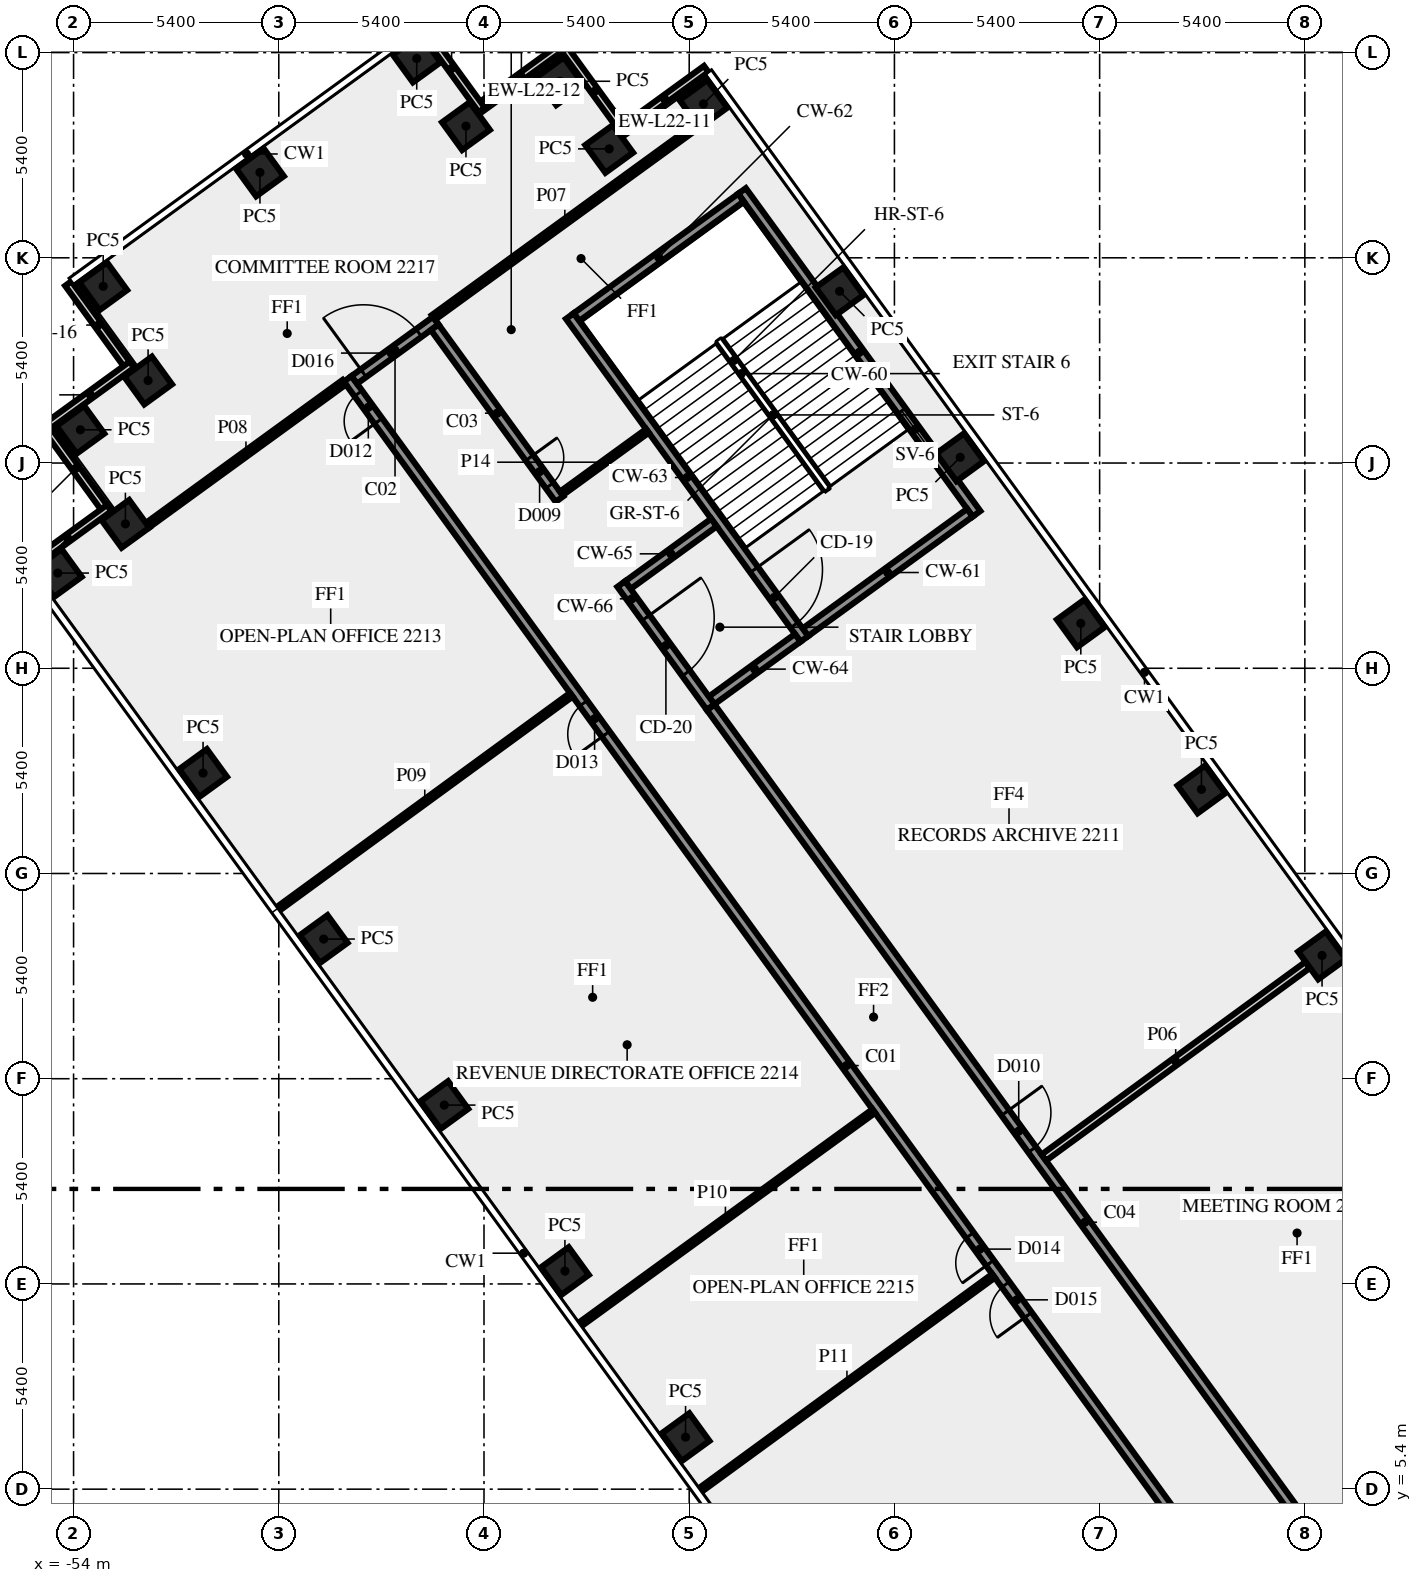
"""IFC4 building model, lengths in metres.
Left out: names, types, materials, properties, quantities, classifications, styles, units other than length and angle.
Written with IfcOpenShell. Run it as: python <this file> out.ifc"""

import sys

from ifc_helpers import new_model, si_unit, direction, frame, frame_2d, origin, origin_2d, place, context, subcontext, project, spatial, rectangle, extrude, element, fill, save


model = new_model("IFC4")
c1 = context("Model", 3, precision=1e-05, world=origin(), true_north=direction((0.0, 1.0)))
c2 = subcontext(c1, "Body", "Model", "MODEL_VIEW")
j1 = project(units=[si_unit("LENGTHUNIT", "METRE"), si_unit("PLANEANGLEUNIT", "RADIAN")], contexts=[c1])
p1 = place(None, origin())
s1 = spatial("IfcSite", under=j1, at=p1, CompositionType="ELEMENT")
p2 = place(p1, origin())
s2 = spatial("IfcBuilding", under=s1, at=p2, CompositionType="ELEMENT")
p3 = place(p2, frame((0.0, 0.0, 97.0)))
s3 = spatial("IfcBuildingStorey", under=s2, at=p3, CompositionType="ELEMENT", Elevation=97.0)
for number, where, z_axis, x_axis in (
    (1, (-21.147, 19.444, 0.0), (0.0, 0.0, 1.0), (-0.588, 0.809, 0.0)),
    (2, (-24.321, 23.812, 0.0), (0.0, 0.0, 1.0), (-0.588, 0.809, 0.0)),
    (3, (-27.495, 28.181, 0.0), (0.0, 0.0, 1.0), (-0.588, 0.809, 0.0)),
    (4, (-30.669, 32.55, 0.0), (0.0, 0.0, 1.0), (-0.588, 0.809, 0.0)),
    (5, (-33.843, 36.919, 0.0), (0.0, 0.0, 1.0), (-0.588, 0.809, 0.0)),
    (6, (-37.425, 41.85, 0.0), (0.0, 0.0, 1.0), (-0.588, 0.809, 0.0)),
    (7, (-39.906, 40.666, 0.0), (0.0, 0.0, 1.0), (-0.588, 0.809, 0.0)),
    (8, (-41.2, 42.445, 0.0), (0.0, 0.0, 1.0), (-0.588, 0.809, 0.0)),
    (9, (-43.675, 41.265, 0.0), (0.0, 0.0, 1.0), (-0.809, -0.588, 0.0)),
    (10, (-44.97, 43.045, 0.0), (0.0, 0.0, 1.0), (-0.809, -0.588, 0.0)),
    (11, (-49.096, 40.047, 0.0), (0.0, 0.0, 1.0), (-0.809, -0.588, 0.0)),
    (12, (-53.22, 37.05, 0.0), (0.0, 0.0, 1.0), (0.588, -0.809, 0.0)),
    (13, (-52.039, 34.571, 0.0), (0.0, 0.0, 1.0), (-0.809, -0.588, 0.0)),
    (14, (-53.82, 33.275, 0.0), (0.0, 0.0, 1.0), (0.588, -0.809, 0.0)),
    (15, (-52.636, 30.8, 0.0), (0.0, 0.0, 1.0), (-0.809, -0.588, 0.0)),
    (16, (-54.415, 29.505, 0.0), (0.0, 0.0, 1.0), (0.588, -0.809, 0.0)),
    (17, (-50.592, 24.243, 0.0), (0.0, 0.0, 1.0), (0.588, -0.809, 0.0)),
    (18, (-47.418, 19.875, 0.0), (0.0, 0.0, 1.0), (0.588, -0.809, 0.0)),
    (19, (-44.244, 15.506, 0.0), (0.0, 0.0, 1.0), (0.588, -0.809, 0.0)),
    (20, (-41.07, 11.137, 0.0), (0.0, 0.0, 1.0), (0.588, -0.809, 0.0)),
    (21, (-37.896, 6.769, 0.0), (0.0, 0.0, 1.0), (0.588, -0.809, 0.0)),
):
    element("IfcColumn", number, at=place(p3, frame(where, z_axis=z_axis, x_axis=x_axis)), inside=s3, PredefinedType="COLUMN", context=c2, shape_type="SweptSolid", body=[
        extrude(rectangle(XDim=0.9, YDim=0.9, at=origin_2d()), origin(), (0.0, 0.0, 1.0), 3.65),
    ])
p4 = place(p3, frame((-37.353, 42.768, 0.0), z_axis=(0.0, 0.0, 1.0), x_axis=(-0.809033161865, -0.587762999008, 0.0)))
e22 = element("IfcWall", 22, at=p4, inside=s3, PredefinedType="SOLIDWALL", context=c2, shape_type="SweptSolid", body=[
    extrude(rectangle(XDim=2.7, YDim=0.2, at=frame_2d((1.35, 0.0))), origin(), (0.0, 0.0, 1.0), 3.65),
])
p5 = place(p3, frame((-39.488, 41.094, 0.0), z_axis=(0.0, 0.0, 1.0), x_axis=(-0.587806000234, 0.809001919707, 0.0)))
e23 = element("IfcWall", 23, at=p5, inside=s3, PredefinedType="SOLIDWALL", context=c2, shape_type="SweptSolid", body=[
    extrude(rectangle(XDim=2.7, YDim=0.2, at=frame_2d((1.35, 0.0))), origin(), (0.0, 0.0, 1.0), 3.65),
])
for number, where, z_axis, x_axis in (
    (24, (-41.124, 43.366, 0.0), (0.0, 0.0, 1.0), (-0.809, -0.588, 0.0)),
    (25, (-43.259, 41.691, 0.0), (0.0, 0.0, 1.0), (-0.588, 0.809, 0.0)),
    (26, (-54.14, 37.123, 0.0), (0.0, 0.0, 1.0), (0.588, -0.809, 0.0)),
    (27, (-52.465, 34.987, 0.0), (0.0, 0.0, 1.0), (-0.809, -0.588, 0.0)),
):
    element("IfcWall", number, at=place(p3, frame(where, z_axis=z_axis, x_axis=x_axis)), inside=s3, PredefinedType="SOLIDWALL", context=c2, shape_type="SweptSolid", body=[
        extrude(rectangle(XDim=2.7, YDim=0.2, at=frame_2d((1.35, 0.0))), origin(), (0.0, 0.0, 1.0), 3.65),
    ])
p6 = place(p3, frame((-54.738, 33.351, 0.0), z_axis=(0.0, 0.0, 1.0), x_axis=(0.587779184282, -0.809021403008, 0.0)))
e28 = element("IfcWall", 28, at=p6, inside=s3, PredefinedType="SOLIDWALL", context=c2, shape_type="SweptSolid", body=[
    extrude(rectangle(XDim=2.7, YDim=0.2, at=frame_2d((1.35, 0.0))), origin(), (0.0, 0.0, 1.0), 3.65),
])
p7 = place(p3, frame((-53.063, 31.216, 0.0), z_axis=(0.0, 0.0, 1.0), x_axis=(-0.809033161865, -0.587762999008, 0.0)))
e29 = element("IfcWall", 29, at=p7, inside=s3, PredefinedType="SOLIDWALL", context=c2, shape_type="SweptSolid", body=[
    extrude(rectangle(XDim=2.7, YDim=0.2, at=frame_2d((1.35, 0.0))), origin(), (0.0, 0.0, 1.0), 3.65),
])
p8 = place(p3, frame((-30.24, 31.064, 0.0), z_axis=(0.0, 0.0, 1.0), x_axis=(-0.587795589702, 0.809009483706, 0.0)))
e30 = element("IfcWall", 30, at=p8, inside=s3, PredefinedType="SHEAR", context=c2, shape_type="SweptSolid", body=[
    extrude(rectangle(XDim=10.5, YDim=0.25, at=frame_2d((5.25, 0.0))), origin(), (0.0, 0.0, 1.0), 3.65),
])
p9 = place(p8, frame((2.15, 0.0, 1.0)))
e31 = element("IfcOpeningElement", 31, at=p9, cuts=e30, PredefinedType="OPENING", context=c2, shape_type="SweptSolid", body=[
    extrude(rectangle(XDim=1.2, YDim=1.2, at=frame_2d((0.6, 0.6))), frame((0.0, 0.135, 0.0), z_axis=(0.0, -1.0, 0.0), x_axis=(1.0, 0.0, 0.0)), (0.0, 0.0, 1.0), 0.27),
])
p10 = place(p3, frame((-30.414, 31.092, 0.0), z_axis=(0.0, 0.0, 1.0), x_axis=(-0.8089984606, -0.587810760999, 0.0)))
e32 = element("IfcWall", 32, at=p10, inside=s3, PredefinedType="SHEAR", context=c2, shape_type="SweptSolid", body=[
    extrude(rectangle(XDim=5.35, YDim=0.25, at=frame_2d((2.675, 0.0))), origin(), (0.0, 0.0, 1.0), 3.65),
])
p11 = place(p3, frame((-36.439, 39.384, 0.0), z_axis=(0.0, 0.0, 1.0), x_axis=(-0.809020161303, -0.587780893365, 0.0)))
e33 = element("IfcWall", 33, at=p11, inside=s3, PredefinedType="SHEAR", context=c2, shape_type="SweptSolid", body=[
    extrude(rectangle(XDim=5.35, YDim=0.25, at=frame_2d((2.675, 0.0))), origin(), (0.0, 0.0, 1.0), 3.65),
])
p12 = place(p3, frame((-40.942, 36.267, 0.0), z_axis=(0.0, 0.0, 1.0), x_axis=(0.587795589702, -0.809009483706, 0.0)))
e34 = element("IfcWall", 34, at=p12, inside=s3, PredefinedType="SHEAR", context=c2, shape_type="SweptSolid", body=[
    extrude(rectangle(XDim=10.5, YDim=0.25, at=frame_2d((5.25, 0.0))), origin(), (0.0, 0.0, 1.0), 3.65),
])
p13 = place(p12, frame((8.25, 0.0, 0.0)))
e35 = element("IfcOpeningElement", 35, at=p13, cuts=e34, PredefinedType="OPENING", context=c2, shape_type="SweptSolid", body=[
    extrude(rectangle(XDim=1.8, YDim=2.1, at=frame_2d((0.9, 1.05))), frame((0.0, 0.135, 0.0), z_axis=(0.0, -1.0, 0.0), x_axis=(1.0, 0.0, 0.0)), (0.0, 0.0, 1.0), 0.27),
])
for number, where, z_axis, x_axis in (
    (36, (-34.945, 27.8, 0.0), (0.0, 0.0, 1.0), (-0.809, -0.588, 0.0)),
    (37, (-37.149, 30.834, 0.0), (0.0, 0.0, 1.0), (-0.809, -0.588, 0.0)),
):
    element("IfcWall", number, at=place(p3, frame(where, z_axis=z_axis, x_axis=x_axis)), inside=s3, PredefinedType="SHEAR", context=c2, shape_type="SweptSolid", body=[
        extrude(rectangle(XDim=2.8, YDim=0.25, at=frame_2d((1.4, 0.0))), origin(), (0.0, 0.0, 1.0), 3.65),
    ])
p14 = place(p3, frame((-39.589, 29.216, 0.0), z_axis=(0.0, 0.0, 1.0), x_axis=(0.587772420479, -0.809026317077, 0.0)))
e38 = element("IfcWall", 38, at=p14, inside=s3, PredefinedType="SHEAR", context=c2, shape_type="SweptSolid", body=[
    extrude(rectangle(XDim=4.0, YDim=0.25, at=frame_2d((2.0, 0.0))), origin(), (0.0, 0.0, 1.0), 3.65),
])
p15 = place(p14, frame((1.1, 0.0, 0.0)))
e39 = element("IfcOpeningElement", 39, at=p15, cuts=e38, PredefinedType="OPENING", context=c2, shape_type="SweptSolid", body=[
    extrude(rectangle(XDim=1.8, YDim=2.1, at=frame_2d((0.9, 1.05))), frame((0.0, 0.135, 0.0), z_axis=(0.0, -1.0, 0.0), x_axis=(1.0, 0.0, 0.0)), (0.0, 0.0, 1.0), 0.27),
])
p16 = place(p3, frame((-20.531, -1.523, 0.0), z_axis=(0.0, 0.0, 1.0), x_axis=(-0.587784593204, 0.809017473231, 0.0)))
e40 = element("IfcWall", 40, at=p16, inside=s3, PredefinedType="SOLIDWALL", context=c2, shape_type="SweptSolid", body=[
    extrude(rectangle(XDim=44.67, YDim=0.25, at=frame_2d((22.335, 0.0))), origin(), (0.0, 0.0, 1.0), 3.65),
])
p17 = place(p16, frame((43.296, 0.0, 0.0)))
e41 = element("IfcOpeningElement", 41, at=p17, cuts=e40, PredefinedType="OPENING", context=c2, shape_type="SweptSolid", body=[
    extrude(rectangle(XDim=0.9, YDim=2.1, at=frame_2d((0.45, 1.05))), frame((0.0, 0.135, 0.0), z_axis=(0.0, -1.0, 0.0), x_axis=(1.0, 0.0, 0.0)), (0.0, 0.0, 1.0), 0.27),
])
p18 = place(p16, frame((15.916, 0.0, 0.0)))
e42 = element("IfcOpeningElement", 42, at=p18, cuts=e40, PredefinedType="OPENING", context=c2, shape_type="SweptSolid", body=[
    extrude(rectangle(XDim=0.9, YDim=2.1, at=frame_2d((0.45, 1.05))), frame((0.0, 0.135, 0.0), z_axis=(0.0, -1.0, 0.0), x_axis=(1.0, 0.0, 0.0)), (0.0, 0.0, 1.0), 0.27),
])
p19 = place(p16, frame((33.116, 0.0, 0.0)))
e43 = element("IfcOpeningElement", 43, at=p19, cuts=e40, PredefinedType="OPENING", context=c2, shape_type="SweptSolid", body=[
    extrude(rectangle(XDim=1.0, YDim=2.1, at=frame_2d((0.5, 1.05))), frame((0.0, 0.135, 0.0), z_axis=(0.0, -1.0, 0.0), x_axis=(1.0, 0.0, 0.0)), (0.0, 0.0, 1.0), 0.27),
])
p20 = place(p16, frame((14.216, 0.0, 0.0)))
e44 = element("IfcOpeningElement", 44, at=p20, cuts=e40, PredefinedType="OPENING", context=c2, shape_type="SweptSolid", body=[
    extrude(rectangle(XDim=1.0, YDim=2.1, at=frame_2d((0.5, 1.05))), frame((0.0, 0.135, 0.0), z_axis=(0.0, -1.0, 0.0), x_axis=(1.0, 0.0, 0.0)), (0.0, 0.0, 1.0), 0.27),
])
p21 = place(p3, frame((-46.613, 34.588, 0.0), z_axis=(0.0, 0.0, 1.0), x_axis=(0.808994936898, 0.587815610607, 0.0)))
e45 = element("IfcWall", 45, at=p21, inside=s3, PredefinedType="SOLIDWALL", context=c2, shape_type="SweptSolid", body=[
    extrude(rectangle(XDim=2.65, YDim=0.25, at=frame_2d((1.325, 0.0))), origin(), (0.0, 0.0, 1.0), 3.65),
])
p22 = place(p21, frame((0.299, 0.0, 0.0)))
e46 = element("IfcOpeningElement", 46, at=p22, cuts=e45, PredefinedType="OPENING", context=c2, shape_type="SweptSolid", body=[
    extrude(rectangle(XDim=1.8, YDim=2.1, at=frame_2d((0.9, 1.05))), frame((0.0, 0.135, 0.0), z_axis=(0.0, -1.0, 0.0), x_axis=(1.0, 0.0, 0.0)), (0.0, 0.0, 1.0), 0.27),
])
p23 = place(p3, frame((-44.497, 35.971, 0.0), z_axis=(0.0, 0.0, 1.0), x_axis=(0.587742866856, -0.809047787501, 0.0)))
e47 = element("IfcWall", 47, at=p23, inside=s3, PredefinedType="SOLIDWALL", context=c2, shape_type="SweptSolid", body=[
    extrude(rectangle(XDim=5.586, YDim=0.25, at=frame_2d((2.793, 0.0))), origin(), (0.0, 0.0, 1.0), 3.65),
])
p24 = place(p23, frame((4.245, 0.0, 0.0)))
e48 = element("IfcOpeningElement", 48, at=p24, cuts=e47, PredefinedType="OPENING", context=c2, shape_type="SweptSolid", body=[
    extrude(rectangle(XDim=0.9, YDim=2.1, at=frame_2d((0.45, 1.05))), frame((0.0, 0.135, 0.0), z_axis=(0.0, -1.0, 0.0), x_axis=(1.0, 0.0, 0.0)), (0.0, 0.0, 1.0), 0.27),
])
p25 = place(p3, frame((-37.232, 25.972, 0.0), z_axis=(0.0, 0.0, 1.0), x_axis=(0.587786323093, -0.809016216391, 0.0)))
e49 = element("IfcWall", 49, at=p25, inside=s3, PredefinedType="SOLIDWALL", context=c2, shape_type="SweptSolid", body=[
    extrude(rectangle(XDim=33.493, YDim=0.25, at=frame_2d((16.747, 0.0))), origin(), (0.0, 0.0, 1.0), 3.65),
])
p26 = place(p25, frame((13.185, 0.0, 0.0)))
e50 = element("IfcOpeningElement", 50, at=p26, cuts=e49, PredefinedType="OPENING", context=c2, shape_type="SweptSolid", body=[
    extrude(rectangle(XDim=1.2, YDim=2.1, at=frame_2d((0.6, 1.05))), frame((0.0, 0.135, 0.0), z_axis=(0.0, -1.0, 0.0), x_axis=(1.0, 0.0, 0.0)), (0.0, 0.0, 1.0), 0.27),
])
p27 = place(p25, frame((29.152, 0.0, 0.0)))
e51 = element("IfcOpeningElement", 51, at=p27, cuts=e49, PredefinedType="OPENING", context=c2, shape_type="SweptSolid", body=[
    extrude(rectangle(XDim=0.9, YDim=2.1, at=frame_2d((0.45, 1.05))), frame((0.0, 0.135, 0.0), z_axis=(0.0, -1.0, 0.0), x_axis=(1.0, 0.0, 0.0)), (0.0, 0.0, 1.0), 0.27),
])
p28 = place(p3, frame((-28.469, 14.124, 0.0), z_axis=(0.0, 0.0, 1.0), x_axis=(0.807597163234, 0.589734535139, 0.0)))
e52 = element("IfcWall", 52, at=p28, inside=s3, PredefinedType="SOLIDWALL", context=c2, shape_type="SweptSolid", body=[
    extrude(rectangle(XDim=8.595, YDim=0.2, at=frame_2d((4.298, 0.0))), origin(), (0.0, 0.0, 1.0), 3.65),
])
p29 = place(p3, frame((-37.614, 41.257, 0.0), z_axis=(0.0, 0.0, 1.0), x_axis=(-0.808991595707, -0.587820208972, 0.0)))
e53 = element("IfcWall", 53, at=p29, inside=s3, PredefinedType="PARTITIONING", context=c2, shape_type="SweptSolid", body=[
    extrude(rectangle(XDim=8.551, YDim=0.15, at=frame_2d((4.275, 0.0))), origin(), (0.0, 0.0, 1.0), 3.65),
])
p30 = place(p3, frame((-46.877, 34.526, 0.0), z_axis=(0.0, 0.0, 1.0), x_axis=(-0.808993566199, -0.587817497059, 0.0)))
e54 = element("IfcWall", 54, at=p30, inside=s3, PredefinedType="PARTITIONING", context=c2, shape_type="SweptSolid", body=[
    extrude(rectangle(XDim=6.395, YDim=0.15, at=frame_2d((3.197, 0.0))), origin(), (0.0, 0.0, 1.0), 3.65),
])
p31 = place(p3, frame((-48.615, 20.671, 0.0), z_axis=(0.0, 0.0, 1.0), x_axis=(0.807691251741, 0.589605666408, 0.0)))
e55 = element("IfcWall", 55, at=p31, inside=s3, PredefinedType="PARTITIONING", context=c2, shape_type="SweptSolid", body=[
    extrude(rectangle(XDim=9.55, YDim=0.12, at=frame_2d((4.775, 0.0))), origin(), (0.0, 0.0, 1.0), 2.75),
])
p32 = place(p3, frame((-32.943, 15.349, 0.0), z_axis=(0.0, 0.0, 1.0), x_axis=(-0.80903787798, -0.587756507402, 0.0)))
e56 = element("IfcWall", 56, at=p32, inside=s3, PredefinedType="PARTITIONING", context=c2, shape_type="SweptSolid", body=[
    extrude(rectangle(XDim=9.652, YDim=0.12, at=frame_2d((4.826, 0.0))), origin(), (0.0, 0.0, 1.0), 2.75),
])
p33 = place(p3, frame((-37.506, 5.381, 0.0), z_axis=(0.0, 0.0, 1.0), x_axis=(0.807645841498, 0.589667868135, 0.0)))
e57 = element("IfcWall", 57, at=p33, inside=s3, PredefinedType="PARTITIONING", context=c2, shape_type="SweptSolid", body=[
    extrude(rectangle(XDim=9.551, YDim=0.12, at=frame_2d((4.775, 0.0))), origin(), (0.0, 0.0, 1.0), 2.75),
])
p34 = place(p3, frame((-41.166, 31.599, 0.0), z_axis=(0.0, 0.0, 1.0), x_axis=(0.809090262332, 0.587684394381, 0.0)))
e58 = element("IfcWall", 58, at=p34, inside=s3, PredefinedType="PARTITIONING", context=c2, shape_type="SweptSolid", body=[
    extrude(rectangle(XDim=2.801, YDim=0.12, at=frame_2d((1.4, 0.0))), origin(), (0.0, 0.0, 1.0), 3.65),
])
p35 = place(p9, origin())
e59 = element("IfcWindow", 59, at=p35, inside=s3, PartitioningType="SINGLE_PANEL", PredefinedType="WINDOW", context=c2, shape_type="SweptSolid", body=[
    extrude(rectangle(XDim=1.2, YDim=1.2, at=frame_2d((0.6, 0.6))), frame((0.0, 0.03, 0.0), z_axis=(0.0, -1.0, 0.0), x_axis=(1.0, 0.0, 0.0)), (0.0, 0.0, 1.0), 0.06),
])
fill(e31, e59)
p36 = place(p13, origin())
e60 = element("IfcDoor", 60, at=p36, inside=s3, OperationType="DOUBLE_DOOR_SINGLE_SWING", PredefinedType="DOOR", context=c2, shape_type="SweptSolid", body=[
    extrude(rectangle(XDim=1.8, YDim=2.1, at=frame_2d((0.9, 1.05))), frame((0.0, 0.025, 0.0), z_axis=(0.0, -1.0, 0.0), x_axis=(1.0, 0.0, 0.0)), (0.0, 0.0, 1.0), 0.05),
])
fill(e35, e60)
p37 = place(p15, origin())
e61 = element("IfcDoor", 61, at=p37, inside=s3, OperationType="DOUBLE_DOOR_SINGLE_SWING", PredefinedType="DOOR", context=c2, shape_type="SweptSolid", body=[
    extrude(rectangle(XDim=1.8, YDim=2.1, at=frame_2d((0.9, 1.05))), frame((0.0, 0.025, 0.0), z_axis=(0.0, -1.0, 0.0), x_axis=(1.0, 0.0, 0.0)), (0.0, 0.0, 1.0), 0.05),
])
fill(e39, e61)
p38 = place(p26, origin())
e62 = element("IfcDoor", 62, at=p38, inside=s3, OperationType="SINGLE_SWING_RIGHT", PredefinedType="DOOR", context=c2, shape_type="SweptSolid", body=[
    extrude(rectangle(XDim=1.2, YDim=2.1, at=frame_2d((0.6, 1.05))), frame((0.0, 0.025, 0.0), z_axis=(0.0, -1.0, 0.0), x_axis=(1.0, 0.0, 0.0)), (0.0, 0.0, 1.0), 0.05),
])
fill(e50, e62)
p39 = place(p24, origin())
e63 = element("IfcDoor", 63, at=p39, inside=s3, OperationType="SINGLE_SWING_RIGHT", PredefinedType="DOOR", context=c2, shape_type="SweptSolid", body=[
    extrude(rectangle(XDim=0.9, YDim=2.1, at=frame_2d((0.45, 1.05))), frame((0.0, 0.025, 0.0), z_axis=(0.0, -1.0, 0.0), x_axis=(1.0, 0.0, 0.0)), (0.0, 0.0, 1.0), 0.05),
])
fill(e48, e63)
p40 = place(p17, origin())
e64 = element("IfcDoor", 64, at=p40, inside=s3, OperationType="SINGLE_SWING_RIGHT", PredefinedType="DOOR", context=c2, shape_type="SweptSolid", body=[
    extrude(rectangle(XDim=0.9, YDim=2.1, at=frame_2d((0.45, 1.05))), frame((0.0, 0.025, 0.0), z_axis=(0.0, -1.0, 0.0), x_axis=(1.0, 0.0, 0.0)), (0.0, 0.0, 1.0), 0.05),
])
fill(e41, e64)
p41 = place(p18, origin())
e65 = element("IfcDoor", 65, at=p41, inside=s3, OperationType="SINGLE_SWING_LEFT", PredefinedType="DOOR", context=c2, shape_type="SweptSolid", body=[
    extrude(rectangle(XDim=0.9, YDim=2.1, at=frame_2d((0.45, 1.05))), frame((0.0, 0.025, 0.0), z_axis=(0.0, -1.0, 0.0), x_axis=(1.0, 0.0, 0.0)), (0.0, 0.0, 1.0), 0.05),
])
fill(e42, e65)
p42 = place(p22, origin())
e66 = element("IfcDoor", 66, at=p42, inside=s3, OperationType="DOUBLE_DOOR_SINGLE_SWING", PredefinedType="DOOR", context=c2, shape_type="SweptSolid", body=[
    extrude(rectangle(XDim=1.8, YDim=2.1, at=frame_2d((0.9, 1.05))), frame((0.0, 0.025, 0.0), z_axis=(0.0, -1.0, 0.0), x_axis=(1.0, 0.0, 0.0)), (0.0, 0.0, 1.0), 0.05),
])
fill(e46, e66)
p43 = place(p19, origin())
e67 = element("IfcDoor", 67, at=p43, inside=s3, OperationType="SINGLE_SWING_RIGHT", PredefinedType="DOOR", context=c2, shape_type="SweptSolid", body=[
    extrude(rectangle(XDim=1.0, YDim=2.1, at=frame_2d((0.5, 1.05))), frame((0.0, 0.025, 0.0), z_axis=(0.0, -1.0, 0.0), x_axis=(1.0, 0.0, 0.0)), (0.0, 0.0, 1.0), 0.05),
])
fill(e43, e67)
p44 = place(p20, origin())
e68 = element("IfcDoor", 68, at=p44, inside=s3, OperationType="SINGLE_SWING_RIGHT", PredefinedType="DOOR", context=c2, shape_type="SweptSolid", body=[
    extrude(rectangle(XDim=1.0, YDim=2.1, at=frame_2d((0.5, 1.05))), frame((0.0, 0.025, 0.0), z_axis=(0.0, -1.0, 0.0), x_axis=(1.0, 0.0, 0.0)), (0.0, 0.0, 1.0), 0.05),
])
fill(e44, e68)
save(model, sys.argv[1])
